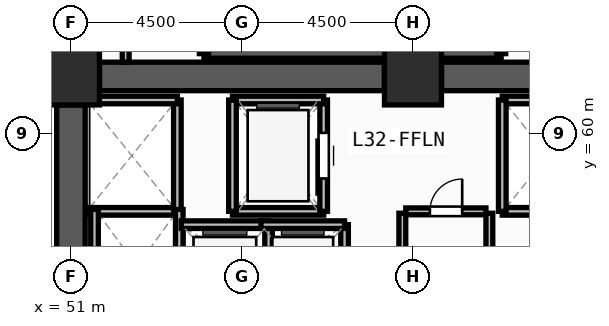
"""IFC4 building model, lengths in metres.
Left out: names, types, materials, properties, quantities, classifications, styles, units other than length and angle.
Written with IfcOpenShell. Run it as: python <this file> out.ifc"""

import sys

from ifc_helpers import new_model, si_unit, direction, frame, frame_2d, origin, origin_2d, place, context, subcontext, project, spatial, rectangle, extrude, source, transform, mapped, element, fill, save


model = new_model("IFC4")
c1 = context("Model", 3, precision=1e-05, world=origin(), true_north=direction((0.0, 1.0)))
c2 = subcontext(c1, "Body", "Model", "MODEL_VIEW")
j1 = project(units=[si_unit("LENGTHUNIT", "METRE"), si_unit("PLANEANGLEUNIT", "RADIAN")], contexts=[c1])
p1 = place(None, origin())
s1 = spatial("IfcSite", under=j1, at=p1, CompositionType="ELEMENT")
p2 = place(p1, origin())
s2 = spatial("IfcBuilding", under=s1, at=p2, CompositionType="ELEMENT")
p3 = place(p2, frame((0.0, 0.0, 124.5)))
s3 = spatial("IfcBuildingStorey", under=s2, at=p3, CompositionType="ELEMENT", Elevation=124.5)
m1 = source(origin(), c2, "Body", "SweptSolid", [
    extrude(rectangle(XDim=1.5, YDim=1.5, at=origin_2d()), origin(), (0.0, 0.0, 1.0), 3.75),
])
for number, where, z_axis, x_axis in (
    (1, (60.0, 61.5, 0.0), (0.0, 0.0, 1.0), (1.0, 0.0, 0.0)),
    (2, (51.0, 61.5, 0.0), (0.0, 0.0, 1.0), (1.0, 0.0, 0.0)),
):
    element("IfcColumn", number, at=place(p3, frame(where, z_axis=z_axis, x_axis=x_axis)), inside=s3, PredefinedType="COLUMN", context=c2, shape_type="MappedRepresentation", body=[
        mapped(m1, transform((0.0, 0.0, 0.0), x_axis=(1.0, 0.0, 0.0), y_axis=(0.0, 1.0, 0.0), z_axis=(0.0, 0.0, 1.0), scale=1.0)),
    ])
for number, where, z_axis, x_axis in (
    (3, (51.75, 61.5, 0.0), (0.0, 0.0, 1.0), (1.0, 0.0, 0.0)),
    (4, (60.75, 61.5, 0.0), (0.0, 0.0, 1.0), (1.0, 0.0, 0.0)),
):
    element("IfcWall", number, at=place(p3, frame(where, z_axis=z_axis, x_axis=x_axis)), inside=s3, PredefinedType="SHEAR", context=c2, shape_type="SweptSolid", body=[
        extrude(rectangle(XDim=7.5, YDim=0.75, at=frame_2d((3.75, 0.0))), origin(), (0.0, 0.0, 1.0), 3.57),
    ])
p4 = place(p3, frame((51.0, 47.25, 0.0), z_axis=(0.0, 0.0, 1.0), x_axis=(0.0, 1.0, 0.0)))
e5 = element("IfcWall", 5, at=p4, inside=s3, PredefinedType="SHEAR", context=c2, shape_type="SweptSolid", body=[
    extrude(rectangle(XDim=13.5, YDim=0.75, at=frame_2d((6.75, 0.0))), origin(), (0.0, 0.0, 1.0), 3.57),
])
p5 = place(p3, frame((54.5, 62.1, 0.0), z_axis=(0.0, 0.0, 1.0), x_axis=(1.0, 0.0, 0.0)))
e6 = element("IfcWall", 6, at=p5, inside=s3, PredefinedType="SOLIDWALL", context=c2, shape_type="SweptSolid", body=[
    extrude(rectangle(XDim=7.82, YDim=0.24, at=frame_2d((3.91, 0.0))), origin(), (0.0, 0.0, 1.0), 3.57),
])
for number, where, z_axis, x_axis in (
    (7, (62.32, 62.1, 0.0), (0.0, 0.0, 1.0), (0.0, 1.0, 0.0)),
    (8, (54.5, 65.54, 0.0), (0.0, 0.0, 1.0), (0.0, -1.0, 0.0)),
):
    element("IfcWall", number, at=place(p3, frame(where, z_axis=z_axis, x_axis=x_axis)), inside=s3, PredefinedType="SOLIDWALL", context=c2, shape_type="SweptSolid", body=[
        extrude(rectangle(XDim=3.44, YDim=0.24, at=frame_2d((1.72, 0.0))), origin(), (0.0, 0.0, 1.0), 3.57),
    ])
p6 = place(p3, frame((55.25, 57.95, 0.0), z_axis=(0.0, 0.0, 1.0), x_axis=(1.0, 0.0, 0.0)))
e9 = element("IfcWall", 9, at=p6, inside=s3, PredefinedType="SOLIDWALL", context=c2, shape_type="SweptSolid", body=[
    extrude(rectangle(XDim=2.4, YDim=0.2, at=frame_2d((1.2, 0.0))), origin(), (0.0, 0.0, 1.0), 3.57),
])
p7 = place(p3, frame((57.65, 57.95, 0.0), z_axis=(0.0, 0.0, 1.0), x_axis=(0.0, 1.0, 0.0)))
e10 = element("IfcWall", 10, at=p7, inside=s3, PredefinedType="SOLIDWALL", context=c2, shape_type="SweptSolid", body=[
    extrude(rectangle(XDim=2.93, YDim=0.2, at=frame_2d((1.465, 0.0))), origin(), (0.0, 0.0, 1.0), 3.57),
])
m2 = source(origin(), c2, "Body", "SweptSolid", [
    extrude(rectangle(XDim=1.2, YDim=2.3, at=frame_2d((0.6, 1.15))), frame((0.0, 0.11, 0.0), z_axis=(0.0, -1.0, 0.0), x_axis=(1.0, 0.0, 0.0)), (0.0, 0.0, 1.0), 0.22),
])
p8 = place(p7, frame((0.865, 0.0, 0.0)))
e11 = element("IfcOpeningElement", 11, at=p8, cuts=e10, PredefinedType="OPENING", context=c2, shape_type="MappedRepresentation", body=[
    mapped(m2, transform((0.0, 0.0, 0.0), x_axis=(1.0, 0.0, 0.0), y_axis=(0.0, 1.0, 0.0), z_axis=(0.0, 0.0, 1.0), scale=1.0)),
])
p9 = place(p3, frame((57.65, 60.88, 0.0), z_axis=(0.0, 0.0, 1.0), x_axis=(-1.0, 0.0, 0.0)))
e12 = element("IfcWall", 12, at=p9, inside=s3, PredefinedType="SOLIDWALL", context=c2, shape_type="SweptSolid", body=[
    extrude(rectangle(XDim=2.4, YDim=0.2, at=frame_2d((1.2, 0.0))), origin(), (0.0, 0.0, 1.0), 3.57),
])
p10 = place(p3, frame((55.25, 60.88, 0.0), z_axis=(0.0, 0.0, 1.0), x_axis=(0.0, -1.0, 0.0)))
e13 = element("IfcWall", 13, at=p10, inside=s3, PredefinedType="SOLIDWALL", context=c2, shape_type="SweptSolid", body=[
    extrude(rectangle(XDim=2.93, YDim=0.2, at=frame_2d((1.465, 0.0))), origin(), (0.0, 0.0, 1.0), 3.57),
])
for number, where, z_axis, x_axis in (
    (14, (62.35, 57.95, 0.0), (0.0, 0.0, 1.0), (1.0, 0.0, 0.0)),
    (15, (64.75, 60.88, 0.0), (0.0, 0.0, 1.0), (-1.0, 0.0, 0.0)),
):
    element("IfcWall", number, at=place(p3, frame(where, z_axis=z_axis, x_axis=x_axis)), inside=s3, PredefinedType="SOLIDWALL", context=c2, shape_type="SweptSolid", body=[
        extrude(rectangle(XDim=2.4, YDim=0.2, at=frame_2d((1.2, 0.0))), origin(), (0.0, 0.0, 1.0), 3.57),
    ])
p11 = place(p3, frame((62.35, 60.88, 0.0), z_axis=(0.0, 0.0, 1.0), x_axis=(0.0, -1.0, 0.0)))
e16 = element("IfcWall", 16, at=p11, inside=s3, PredefinedType="SOLIDWALL", context=c2, shape_type="SweptSolid", body=[
    extrude(rectangle(XDim=2.93, YDim=0.2, at=frame_2d((1.465, 0.0))), origin(), (0.0, 0.0, 1.0), 3.57),
])
p12 = place(p3, frame((51.4, 57.95, 0.0), z_axis=(0.0, 0.0, 1.0), x_axis=(1.0, 0.0, 0.0)))
e17 = element("IfcWall", 17, at=p12, inside=s3, PredefinedType="SOLIDWALL", context=c2, shape_type="SweptSolid", body=[
    extrude(rectangle(XDim=2.4, YDim=0.2, at=frame_2d((1.2, 0.0))), origin(), (0.0, 0.0, 1.0), 3.57),
])
p13 = place(p3, frame((53.8, 57.95, 0.0), z_axis=(0.0, 0.0, 1.0), x_axis=(0.0, 1.0, 0.0)))
e18 = element("IfcWall", 18, at=p13, inside=s3, PredefinedType="SOLIDWALL", context=c2, shape_type="SweptSolid", body=[
    extrude(rectangle(XDim=2.93, YDim=0.2, at=frame_2d((1.465, 0.0))), origin(), (0.0, 0.0, 1.0), 3.57),
])
p14 = place(p3, frame((53.8, 60.88, 0.0), z_axis=(0.0, 0.0, 1.0), x_axis=(-1.0, 0.0, 0.0)))
e19 = element("IfcWall", 19, at=p14, inside=s3, PredefinedType="SOLIDWALL", context=c2, shape_type="SweptSolid", body=[
    extrude(rectangle(XDim=2.4, YDim=0.2, at=frame_2d((1.2, 0.0))), origin(), (0.0, 0.0, 1.0), 3.57),
])
for number, where, z_axis, x_axis in (
    (20, (53.85, 55.0, 0.0), (0.0, 0.0, 1.0), (0.0, 1.0, 0.0)),
    (21, (51.62, 58.0, 0.0), (0.0, 0.0, 1.0), (0.0, -1.0, 0.0)),
):
    element("IfcWall", number, at=place(p3, frame(where, z_axis=z_axis, x_axis=x_axis)), inside=s3, PredefinedType="SOLIDWALL", context=c2, shape_type="SweptSolid", body=[
        extrude(rectangle(XDim=3.0, YDim=0.2, at=frame_2d((1.5, 0.0))), origin(), (0.0, 0.0, 1.0), 3.57),
    ])
p15 = place(p3, frame((56.2, 55.0, 0.0), z_axis=(0.0, 0.0, 1.0), x_axis=(0.0, 1.0, 0.0)))
e22 = element("IfcWall", 22, at=p15, inside=s3, PredefinedType="SOLIDWALL", context=c2, shape_type="SweptSolid", body=[
    extrude(rectangle(XDim=2.6, YDim=0.2, at=frame_2d((1.3, 0.0))), origin(), (0.0, 0.0, 1.0), 3.57),
])
p16 = place(p3, frame((56.2, 57.6, 0.0), z_axis=(0.0, 0.0, 1.0), x_axis=(-1.0, 0.0, 0.0)))
e23 = element("IfcWall", 23, at=p16, inside=s3, PredefinedType="SOLIDWALL", context=c2, shape_type="SweptSolid", body=[
    extrude(rectangle(XDim=2.3, YDim=0.2, at=frame_2d((1.15, 0.0))), origin(), (0.0, 0.0, 1.0), 3.57),
])
p17 = place(p3, frame((58.2, 55.0, 0.0), z_axis=(0.0, 0.0, 1.0), x_axis=(0.0, 1.0, 0.0)))
e24 = element("IfcWall", 24, at=p17, inside=s3, PredefinedType="SOLIDWALL", context=c2, shape_type="SweptSolid", body=[
    extrude(rectangle(XDim=2.6, YDim=0.2, at=frame_2d((1.3, 0.0))), origin(), (0.0, 0.0, 1.0), 3.57),
])
p18 = place(p3, frame((58.2, 57.6, 0.0), z_axis=(0.0, 0.0, 1.0), x_axis=(-1.0, 0.0, 0.0)))
e25 = element("IfcWall", 25, at=p18, inside=s3, PredefinedType="SOLIDWALL", context=c2, shape_type="SweptSolid", body=[
    extrude(rectangle(XDim=2.2, YDim=0.2, at=frame_2d((1.1, 0.0))), origin(), (0.0, 0.0, 1.0), 3.57),
])
p19 = place(p3, frame((59.81, 57.95, 0.0), z_axis=(0.0, 0.0, 1.0), x_axis=(1.0, 0.0, 0.0)))
e26 = element("IfcWall", 26, at=p19, inside=s3, PredefinedType="PARTITIONING", context=c2, shape_type="SweptSolid", body=[
    extrude(rectangle(XDim=2.11, YDim=0.18, at=frame_2d((1.055, 0.0))), origin(), (0.0, 0.0, 1.0), 3.57),
])
m3 = source(origin(), c2, "Body", "SweptSolid", [
    extrude(rectangle(XDim=0.85, YDim=2.1, at=frame_2d((0.425, 1.05))), frame((0.0, 0.1, 0.0), z_axis=(0.0, -1.0, 0.0), x_axis=(1.0, 0.0, 0.0)), (0.0, 0.0, 1.0), 0.2),
])
p20 = place(p19, frame((0.635, 0.0, 0.0)))
e27 = element("IfcOpeningElement", 27, at=p20, cuts=e26, PredefinedType="OPENING", context=c2, shape_type="MappedRepresentation", body=[
    mapped(m3, transform((0.0, 0.0, 0.0), x_axis=(1.0, 0.0, 0.0), y_axis=(0.0, 1.0, 0.0), z_axis=(0.0, 0.0, 1.0), scale=1.0)),
])
for number, where, z_axis, x_axis in (
    (28, (59.72, 55.02, 0.0), (0.0, 0.0, 1.0), (0.0, 1.0, 0.0)),
    (29, (62.01, 55.02, 0.0), (0.0, 0.0, 1.0), (0.0, 1.0, 0.0)),
):
    element("IfcWall", number, at=place(p3, frame(where, z_axis=z_axis, x_axis=x_axis)), inside=s3, PredefinedType="PARTITIONING", context=c2, shape_type="SweptSolid", body=[
        extrude(rectangle(XDim=2.88, YDim=0.18, at=frame_2d((1.44, 0.0))), origin(), (0.0, 0.0, 1.0), 3.57),
    ])
p21 = place(p3, frame((50.54, 61.95, 0.0), z_axis=(0.0, 0.0, 1.0), x_axis=(0.0, 1.0, 0.0)))
e30 = element("IfcWall", 30, at=p21, inside=s3, PredefinedType="PARTITIONING", context=c2, shape_type="SweptSolid", body=[
    extrude(rectangle(XDim=3.63, YDim=0.18, at=frame_2d((1.815, 0.0))), origin(), (0.0, 0.0, 1.0), 3.57),
])
p22 = place(p3, frame((52.44, 61.875, 0.0), z_axis=(0.0, 0.0, 1.0), x_axis=(0.0, 1.0, 0.0)))
e31 = element("IfcWall", 31, at=p22, inside=s3, PredefinedType="PARTITIONING", context=c2, shape_type="SweptSolid", body=[
    extrude(rectangle(XDim=3.705, YDim=0.18, at=frame_2d((1.853, 0.0))), origin(), (0.0, 0.0, 1.0), 3.57),
])
m4 = source(origin(), c2, "Body", "SweptSolid", [
    extrude(rectangle(XDim=1.2, YDim=2.3, at=frame_2d((0.6, 1.15))), frame((0.0, 0.025, 0.0), z_axis=(0.0, -1.0, 0.0), x_axis=(1.0, 0.0, 0.0)), (0.0, 0.0, 1.0), 0.05),
])
p23 = place(p8, origin())
e32 = element("IfcDoor", 32, at=p23, inside=s3, OperationType="SLIDING_TO_LEFT", PredefinedType="DOOR", context=c2, shape_type="MappedRepresentation", body=[
    mapped(m4, transform((0.0, 0.0, 0.0), x_axis=(1.0, 0.0, 0.0), y_axis=(0.0, 1.0, 0.0), z_axis=(0.0, 0.0, 1.0), scale=1.0)),
])
fill(e11, e32)
m5 = source(origin(), c2, "Body", "SweptSolid", [
    extrude(rectangle(XDim=0.85, YDim=2.1, at=frame_2d((0.425, 1.05))), frame((0.0, 0.025, 0.0), z_axis=(0.0, -1.0, 0.0), x_axis=(1.0, 0.0, 0.0)), (0.0, 0.0, 1.0), 0.05),
])
p24 = place(p20, origin())
e33 = element("IfcDoor", 33, at=p24, inside=s3, OperationType="SINGLE_SWING_RIGHT", PredefinedType="DOOR", context=c2, shape_type="MappedRepresentation", body=[
    mapped(m5, transform((0.0, 0.0, 0.0), x_axis=(1.0, 0.0, 0.0), y_axis=(0.0, 1.0, 0.0), z_axis=(0.0, 0.0, 1.0), scale=1.0)),
])
fill(e27, e33)
save(model, sys.argv[1])
